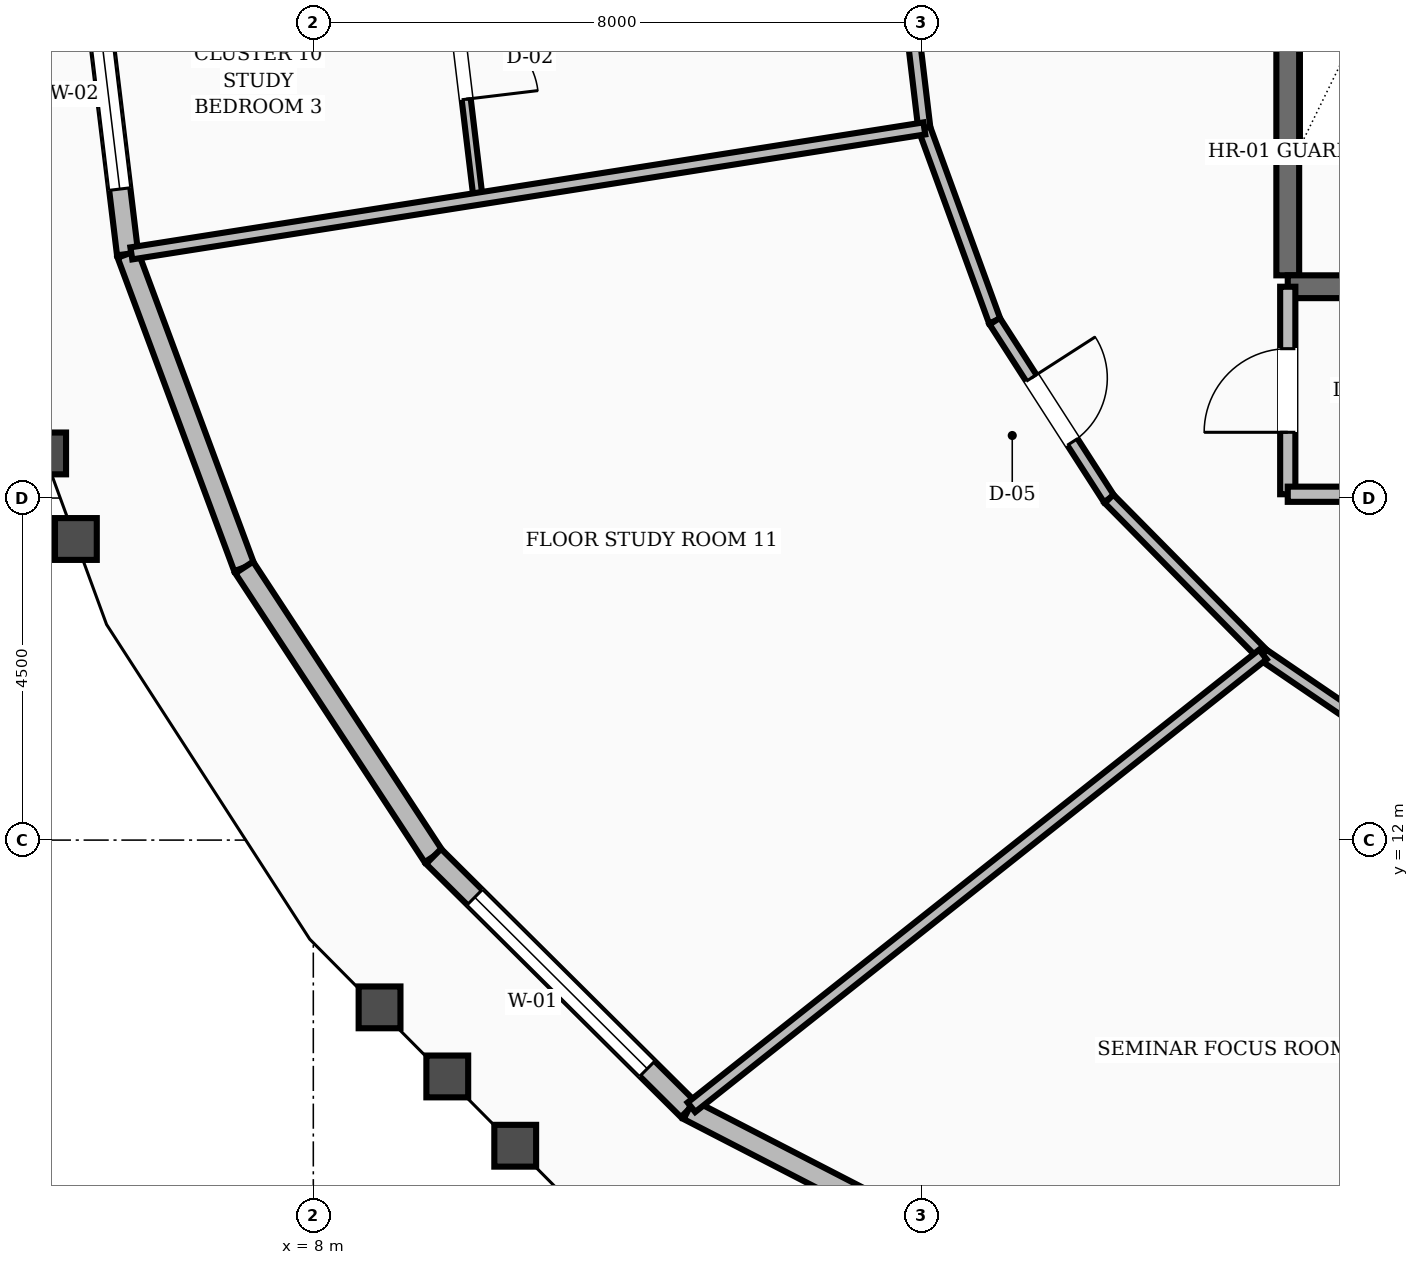
"""IFC4 building model, lengths in metres.
Left out: names, types, materials, properties, quantities, classifications, styles, units other than length and angle.
Written with IfcOpenShell. Run it as: python <this file> out.ifc"""

import sys

from ifc_helpers import new_model, si_unit, direction, frame, frame_2d, origin, place, context, subcontext, project, spatial, rectangle, extrude, element, fill, save


model = new_model("IFC4")
c1 = context("Model", 3, precision=1e-05, world=origin(), true_north=direction((0.0, 1.0)))
c2 = subcontext(c1, "Body", "Model", "MODEL_VIEW")
j1 = project(units=[si_unit("LENGTHUNIT", "METRE"), si_unit("PLANEANGLEUNIT", "RADIAN")], contexts=[c1])
p1 = place(None, origin())
s1 = spatial("IfcSite", under=j1, at=p1, CompositionType="ELEMENT")
p2 = place(p1, origin())
s2 = spatial("IfcBuilding", under=s1, at=p2, CompositionType="ELEMENT")
p3 = place(p2, frame((0.0, 0.0, 91.6)))
s3 = spatial("IfcBuildingStorey", under=s2, at=p3, CompositionType="ELEMENT", Elevation=91.6)
p4 = place(p3, frame((20.82, 19.43, 0.0), z_axis=(0.0, 0.0, 1.0), x_axis=(0.0, 1.0, 0.0)))
e1 = element("IfcWall", 1, at=p4, inside=s3, PredefinedType="SHEAR", context=c2, shape_type="SweptSolid", body=[
    extrude(rectangle(XDim=8.74, YDim=0.3, at=frame_2d((4.37, 0.0))), origin(), (0.0, 0.0, 1.0), 3.6),
])
p5 = place(p3, frame((20.82, 19.28, 0.0), z_axis=(0.0, 0.0, 1.0), x_axis=(1.0, 0.0, 0.0)))
e2 = element("IfcWall", 2, at=p5, inside=s3, PredefinedType="SHEAR", context=c2, shape_type="SweptSolid", body=[
    extrude(rectangle(XDim=3.6, YDim=0.3, at=frame_2d((1.8, 0.0))), origin(), (0.0, 0.0, 1.0), 3.6),
])
p6 = place(p5, frame((1.3, 0.0, 0.0)))
e3 = element("IfcOpeningElement", 3, at=p6, cuts=e2, PredefinedType="OPENING", context=c2, shape_type="SweptSolid", body=[
    extrude(rectangle(XDim=1.1, YDim=2.1, at=frame_2d((0.55, 1.05))), frame((0.0, 0.16, 0.0), z_axis=(0.0, -1.0, 0.0), x_axis=(1.0, 0.0, 0.0)), (0.0, 0.0, 1.0), 0.32),
])
p7 = place(p3, frame((5.039, 24.0, 0.0), z_axis=(0.0, 0.0, 1.0), x_axis=(0.11991619344, -0.992784018078, 0.0)))
e4 = element("IfcWall", 4, at=p7, inside=s3, PredefinedType="STANDARD", context=c2, shape_type="SweptSolid", body=[
    extrude(rectangle(XDim=4.32, YDim=0.28, at=frame_2d((2.16, 0.0))), origin(), (0.0, 0.0, 1.0), 2.71),
])
p8 = place(p7, frame((0.86, 0.0, 0.8)))
e5 = element("IfcOpeningElement", 5, at=p8, cuts=e4, PredefinedType="OPENING", context=c2, shape_type="SweptSolid", body=[
    extrude(rectangle(XDim=2.6, YDim=1.65, at=frame_2d((1.3, 0.825))), frame((0.0, 0.15, 0.0), z_axis=(0.0, -1.0, 0.0), x_axis=(1.0, 0.0, 0.0)), (0.0, 0.0, 1.0), 0.3),
])
p9 = place(p3, frame((5.557, 19.711, 0.0), z_axis=(0.0, 0.0, 1.0), x_axis=(0.348647575397, -0.937253897388, 0.0)))
e6 = element("IfcWall", 6, at=p9, inside=s3, PredefinedType="STANDARD", context=c2, shape_type="SweptSolid", body=[
    extrude(rectangle(XDim=4.4, YDim=0.28, at=frame_2d((2.2, 0.0))), origin(), (0.0, 0.0, 1.0), 2.71),
])
p10 = place(p3, frame((7.091, 15.587, 0.0), z_axis=(0.0, 0.0, 1.0), x_axis=(0.548224545432, -0.836331183076, 0.0)))
e7 = element("IfcWall", 7, at=p10, inside=s3, PredefinedType="STANDARD", context=c2, shape_type="SweptSolid", body=[
    extrude(rectangle(XDim=4.545, YDim=0.28, at=frame_2d((2.272, 0.0))), origin(), (0.0, 0.0, 1.0), 2.71),
])
p11 = place(p3, frame((9.582, 11.786, 0.0), z_axis=(0.0, 0.0, 1.0), x_axis=(0.709375776042, -0.704830482006, 0.0)))
e8 = element("IfcWall", 8, at=p11, inside=s3, PredefinedType="STANDARD", context=c2, shape_type="SweptSolid", body=[
    extrude(rectangle(XDim=4.727, YDim=0.28, at=frame_2d((2.363, 0.0))), origin(), (0.0, 0.0, 1.0), 2.71),
])
p12 = place(p11, frame((0.763, 0.0, 0.8)))
e9 = element("IfcOpeningElement", 9, at=p12, cuts=e8, PredefinedType="OPENING", context=c2, shape_type="SweptSolid", body=[
    extrude(rectangle(XDim=3.2, YDim=1.65, at=frame_2d((1.6, 0.825))), frame((0.0, 0.15, 0.0), z_axis=(0.0, -1.0, 0.0), x_axis=(1.0, 0.0, 0.0)), (0.0, 0.0, 1.0), 0.3),
])
p13 = place(p3, frame((12.935, 8.454, 0.0), z_axis=(0.0, 0.0, 1.0), x_axis=(0.888677335441, -0.458533088745, 0.0)))
e10 = element("IfcWall", 10, at=p13, inside=s3, PredefinedType="STANDARD", context=c2, shape_type="SweptSolid", body=[
    extrude(rectangle(XDim=5.04, YDim=0.28, at=frame_2d((2.52, 0.0))), origin(), (0.0, 0.0, 1.0), 2.71),
])
p14 = place(p3, frame((20.82, 16.55, 0.0), z_axis=(0.0, 0.0, 1.0), x_axis=(0.0, 1.0, 0.0)))
e11 = element("IfcWall", 11, at=p14, inside=s3, PredefinedType="SOLIDWALL", context=c2, shape_type="SweptSolid", body=[
    extrude(rectangle(XDim=2.73, YDim=0.2, at=frame_2d((1.365, 0.0))), origin(), (0.0, 0.0, 1.0), 2.71),
])
p15 = place(p14, frame((0.815, 0.0, 0.0)))
e12 = element("IfcOpeningElement", 12, at=p15, cuts=e11, PredefinedType="OPENING", context=c2, shape_type="SweptSolid", body=[
    extrude(rectangle(XDim=1.1, YDim=2.1, at=frame_2d((0.55, 1.05))), frame((0.0, 0.11, 0.0), z_axis=(0.0, -1.0, 0.0), x_axis=(1.0, 0.0, 0.0)), (0.0, 0.0, 1.0), 0.22),
])
p16 = place(p3, frame((20.82, 16.55, 0.0), z_axis=(0.0, 0.0, 1.0), x_axis=(1.0, 0.0, 0.0)))
e13 = element("IfcWall", 13, at=p16, inside=s3, PredefinedType="SOLIDWALL", context=c2, shape_type="SweptSolid", body=[
    extrude(rectangle(XDim=3.98, YDim=0.2, at=frame_2d((1.99, 0.0))), origin(), (0.0, 0.0, 1.0), 2.71),
])
p17 = place(p3, frame((15.726, 24.0, 0.0), z_axis=(0.0, 0.0, 1.0), x_axis=(0.117763961213, -0.99304161516, 0.0)))
e14 = element("IfcWall", 14, at=p17, inside=s3, PredefinedType="SOLIDWALL", context=c2, shape_type="SweptSolid", body=[
    extrude(rectangle(XDim=2.656, YDim=0.16, at=frame_2d((1.328, 0.0))), origin(), (0.0, 0.0, 1.0), 2.71),
])
p18 = place(p3, frame((16.039, 21.363, 0.0), z_axis=(0.0, 0.0, 1.0), x_axis=(0.343013437329, -0.939330496583, 0.0)))
e15 = element("IfcWall", 15, at=p18, inside=s3, PredefinedType="SOLIDWALL", context=c2, shape_type="SweptSolid", body=[
    extrude(rectangle(XDim=2.7, YDim=0.16, at=frame_2d((1.35, 0.0))), origin(), (0.0, 0.0, 1.0), 2.71),
])
p19 = place(p3, frame((16.965, 18.827, 0.0), z_axis=(0.0, 0.0, 1.0), x_axis=(0.541126045017, -0.840941498206, 0.0)))
e16 = element("IfcWall", 16, at=p19, inside=s3, PredefinedType="SOLIDWALL", context=c2, shape_type="SweptSolid", body=[
    extrude(rectangle(XDim=2.779, YDim=0.16, at=frame_2d((1.39, 0.0))), origin(), (0.0, 0.0, 1.0), 2.71),
])
p20 = place(p19, frame((0.89, 0.0, 0.0)))
e17 = element("IfcOpeningElement", 17, at=p20, cuts=e16, PredefinedType="OPENING", context=c2, shape_type="SweptSolid", body=[
    extrude(rectangle(XDim=1.0, YDim=2.1, at=frame_2d((0.5, 1.05))), frame((0.0, 0.09, 0.0), z_axis=(0.0, -1.0, 0.0), x_axis=(1.0, 0.0, 0.0)), (0.0, 0.0, 1.0), 0.18),
])
p21 = place(p3, frame((18.469, 16.49, 0.0), z_axis=(0.0, 0.0, 1.0), x_axis=(0.702811997, -0.711375636969, 0.0)))
e18 = element("IfcWall", 18, at=p21, inside=s3, PredefinedType="SOLIDWALL", context=c2, shape_type="SweptSolid", body=[
    extrude(rectangle(XDim=2.879, YDim=0.16, at=frame_2d((1.44, 0.0))), origin(), (0.0, 0.0, 1.0), 2.71),
])
p22 = place(p3, frame((20.492, 14.441, 0.0), z_axis=(0.0, 0.0, 1.0), x_axis=(0.826293096206, -0.56324037423, 0.0)))
e19 = element("IfcWall", 19, at=p22, inside=s3, PredefinedType="SOLIDWALL", context=c2, shape_type="SweptSolid", body=[
    extrude(rectangle(XDim=2.985, YDim=0.16, at=frame_2d((1.492, 0.0))), origin(), (0.0, 0.0, 1.0), 2.71),
])
p23 = place(p3, frame((9.741, 24.0, 0.0), z_axis=(0.0, 0.0, 1.0), x_axis=(0.119217667406, -0.992868142191, 0.0)))
e20 = element("IfcWall", 20, at=p23, inside=s3, PredefinedType="PARTITIONING", context=c2, shape_type="SweptSolid", body=[
    extrude(rectangle(XDim=3.588, YDim=0.12, at=frame_2d((1.794, 0.0))), origin(), (0.0, 0.0, 1.0), 2.71),
])
p24 = place(p23, frame((1.319, 0.0, 0.0)))
e21 = element("IfcOpeningElement", 21, at=p24, cuts=e20, PredefinedType="OPENING", context=c2, shape_type="SweptSolid", body=[
    extrude(rectangle(XDim=0.95, YDim=2.1, at=frame_2d((0.475, 1.05))), frame((0.0, 0.07, 0.0), z_axis=(0.0, -1.0, 0.0), x_axis=(1.0, 0.0, 0.0)), (0.0, 0.0, 1.0), 0.14),
])
p25 = place(p3, frame((16.039, 21.363, 0.0), z_axis=(0.0, 0.0, 1.0), x_axis=(-0.987810338439, -0.155662247421, 0.0)))
e22 = element("IfcWall", 22, at=p25, inside=s3, PredefinedType="SOLIDWALL", context=c2, shape_type="SweptSolid", body=[
    extrude(rectangle(XDim=10.562, YDim=0.16, at=frame_2d((5.281, 0.0))), origin(), (0.0, 0.0, 1.0), 2.71),
])
p26 = place(p3, frame((20.492, 14.441, 0.0), z_axis=(0.0, 0.0, 1.0), x_axis=(-0.783820213827, -0.620987819846, 0.0)))
e23 = element("IfcWall", 23, at=p26, inside=s3, PredefinedType="SOLIDWALL", context=c2, shape_type="SweptSolid", body=[
    extrude(rectangle(XDim=9.591, YDim=0.16, at=frame_2d((4.796, 0.0))), origin(), (0.0, 0.0, 1.0), 2.71),
])
p27 = place(p8, origin())
e24 = element("IfcWindow", 24, at=p27, inside=s3, PartitioningType="SINGLE_PANEL", PredefinedType="WINDOW", context=c2, shape_type="SweptSolid", body=[
    extrude(rectangle(XDim=2.6, YDim=1.65, at=frame_2d((1.3, 0.825))), frame((0.0, 0.03, 0.0), z_axis=(0.0, -1.0, 0.0), x_axis=(1.0, 0.0, 0.0)), (0.0, 0.0, 1.0), 0.06),
])
fill(e5, e24)
p28 = place(p12, origin())
e25 = element("IfcWindow", 25, at=p28, inside=s3, PartitioningType="SINGLE_PANEL", PredefinedType="WINDOW", context=c2, shape_type="SweptSolid", body=[
    extrude(rectangle(XDim=3.2, YDim=1.65, at=frame_2d((1.6, 0.825))), frame((0.0, 0.03, 0.0), z_axis=(0.0, -1.0, 0.0), x_axis=(1.0, 0.0, 0.0)), (0.0, 0.0, 1.0), 0.06),
])
fill(e9, e25)
p29 = place(p15, origin())
e26 = element("IfcDoor", 26, at=p29, inside=s3, OperationType="SINGLE_SWING_LEFT", PredefinedType="DOOR", context=c2, shape_type="SweptSolid", body=[
    extrude(rectangle(XDim=1.1, YDim=2.1, at=frame_2d((0.55, 1.05))), frame((0.0, 0.025, 0.0), z_axis=(0.0, -1.0, 0.0), x_axis=(1.0, 0.0, 0.0)), (0.0, 0.0, 1.0), 0.05),
])
fill(e12, e26)
p30 = place(p24, origin())
e27 = element("IfcDoor", 27, at=p30, inside=s3, OperationType="SINGLE_SWING_RIGHT", PredefinedType="DOOR", context=c2, shape_type="SweptSolid", body=[
    extrude(rectangle(XDim=0.95, YDim=2.1, at=frame_2d((0.475, 1.05))), frame((0.0, 0.025, 0.0), z_axis=(0.0, -1.0, 0.0), x_axis=(1.0, 0.0, 0.0)), (0.0, 0.0, 1.0), 0.05),
])
fill(e21, e27)
p31 = place(p20, origin())
e28 = element("IfcDoor", 28, at=p31, inside=s3, OperationType="SINGLE_SWING_LEFT", PredefinedType="DOOR", context=c2, shape_type="SweptSolid", body=[
    extrude(rectangle(XDim=1.0, YDim=2.1, at=frame_2d((0.5, 1.05))), frame((0.0, 0.025, 0.0), z_axis=(0.0, -1.0, 0.0), x_axis=(1.0, 0.0, 0.0)), (0.0, 0.0, 1.0), 0.05),
])
fill(e17, e28)
save(model, sys.argv[1])
